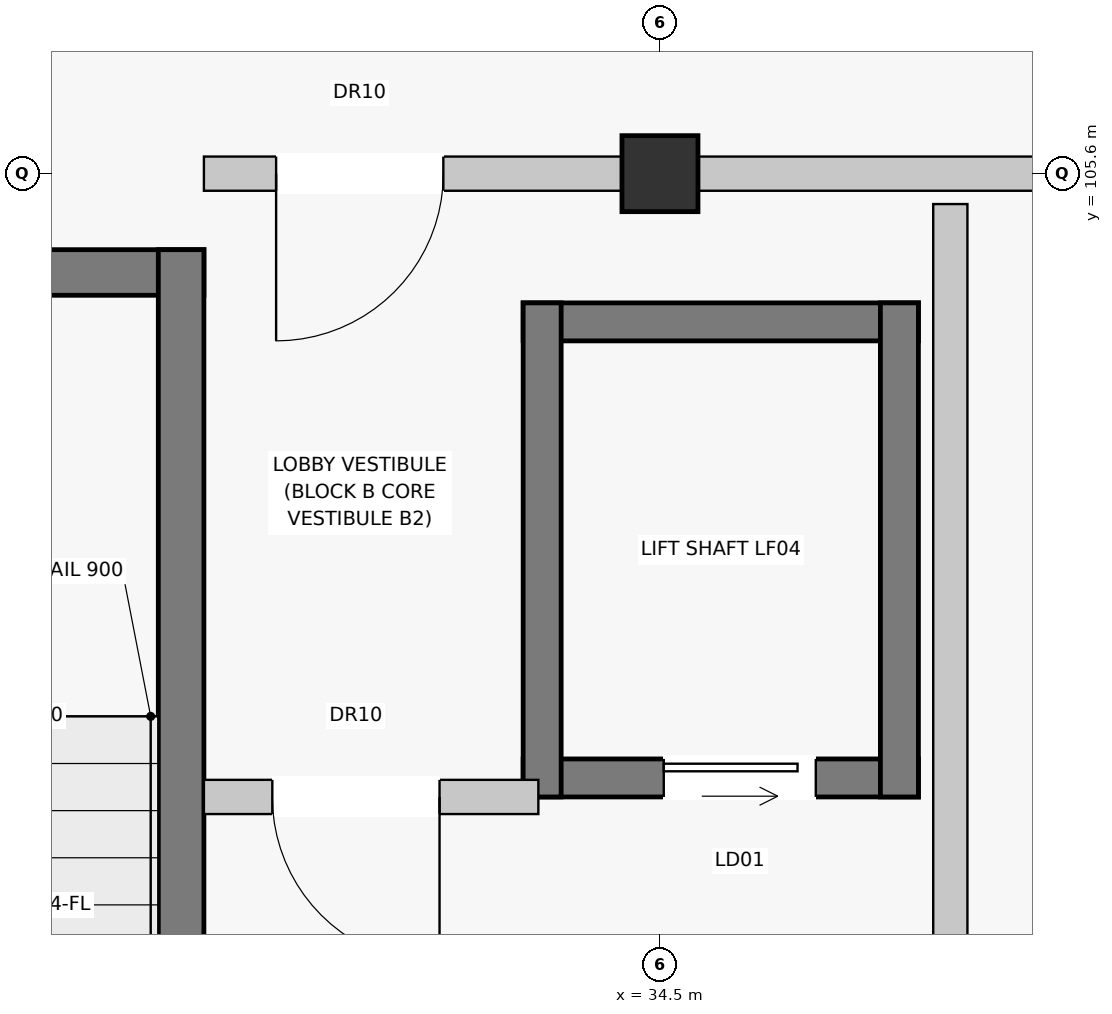
"""IFC4 building model, lengths in metres.
Left out: names, types, materials, properties, quantities, classifications, styles, units other than length and angle.
Written with IfcOpenShell. Run it as: python <this file> out.ifc"""

import sys

from ifc_helpers import new_model, si_unit, direction, frame, frame_2d, origin, origin_with_axes, origin_2d, place, context, subcontext, project, spatial, rectangle, extrude, element, fill, save


model = new_model("IFC4")
c1 = context("Model", 3, precision=1e-05, world=origin(), true_north=direction((0.0, 1.0)))
c2 = subcontext(c1, "Body", "Model", "MODEL_VIEW")
j1 = project(units=[si_unit("LENGTHUNIT", "METRE"), si_unit("PLANEANGLEUNIT", "RADIAN")], contexts=[c1])
p1 = place(None, origin())
s1 = spatial("IfcSite", under=j1, at=p1, CompositionType="ELEMENT")
p2 = place(p1, origin())
s2 = spatial("IfcBuilding", under=s1, at=p2, CompositionType="ELEMENT")
p3 = place(p2, frame((0.0, 0.0, 11.2)))
s3 = spatial("IfcBuildingStorey", under=s2, at=p3, CompositionType="ELEMENT", Elevation=11.2)
p4 = place(p3, frame((34.5, 105.6, 0.0), z_axis=(0.0, 0.0, 1.0), x_axis=(1.0, 0.0, 0.0)))
e1 = element("IfcColumn", 1, at=p4, inside=s3, PredefinedType="COLUMN", context=c2, shape_type="SweptSolid", body=[
    extrude(rectangle(XDim=0.5, YDim=0.5, at=origin_2d()), origin(), (0.0, 0.0, 1.0), 3.2),
])
p5 = place(p3, frame((27.9, 104.95, 0.0), z_axis=(0.0, 0.0, 1.0), x_axis=(1.0, 0.0, 0.0)))
e2 = element("IfcWall", 2, at=p5, inside=s3, PredefinedType="SHEAR", context=c2, shape_type="SweptSolid", body=[
    extrude(rectangle(XDim=3.6, YDim=0.3, at=frame_2d((1.8, 0.0))), origin(), (0.0, 0.0, 1.0), 2.94),
])
p6 = place(p3, frame((31.35, 97.6, 0.0), z_axis=(0.0, 0.0, 1.0), x_axis=(0.0, 1.0, 0.0)))
e3 = element("IfcWall", 3, at=p6, inside=s3, PredefinedType="SHEAR", context=c2, shape_type="SweptSolid", body=[
    extrude(rectangle(XDim=7.5, YDim=0.3, at=frame_2d((3.75, 0.0))), origin(), (0.0, 0.0, 1.0), 2.94),
])
p7 = place(p6, frame((0.65, 0.0, 0.0)))
e4 = element("IfcOpeningElement", 4, at=p7, cuts=e3, PredefinedType="OPENING", context=c2, shape_type="SweptSolid", body=[
    extrude(rectangle(XDim=1.15, YDim=2.15, at=frame_2d((0.575, 1.075))), frame((0.0, 0.162, 0.0), z_axis=(0.0, -1.0, 0.0), x_axis=(1.0, 0.0, 0.0)), (0.0, 0.0, 1.0), 0.324),
])
p8 = place(p3, frame((33.6, 101.625, 0.0), z_axis=(0.0, 0.0, 1.0), x_axis=(1.0, 0.0, 0.0)))
e5 = element("IfcWall", 5, at=p8, inside=s3, PredefinedType="SHEAR", context=c2, shape_type="SweptSolid", body=[
    extrude(rectangle(XDim=2.6, YDim=0.25, at=frame_2d((1.3, 0.0))), origin(), (0.0, 0.0, 1.0), 2.94),
])
p9 = place(p8, frame((0.925, 0.0, 0.0)))
e6 = element("IfcOpeningElement", 6, at=p9, cuts=e5, PredefinedType="OPENING", context=c2, shape_type="SweptSolid", body=[
    extrude(rectangle(XDim=1.0, YDim=2.1, at=frame_2d((0.5, 1.05))), frame((0.0, 0.137, 0.0), z_axis=(0.0, -1.0, 0.0), x_axis=(1.0, 0.0, 0.0)), (0.0, 0.0, 1.0), 0.274),
])
p10 = place(p3, frame((33.6, 104.625, 0.0), z_axis=(0.0, 0.0, 1.0), x_axis=(1.0, 0.0, 0.0)))
e7 = element("IfcWall", 7, at=p10, inside=s3, PredefinedType="SHEAR", context=c2, shape_type="SweptSolid", body=[
    extrude(rectangle(XDim=2.6, YDim=0.25, at=frame_2d((1.3, 0.0))), origin(), (0.0, 0.0, 1.0), 2.94),
])
for number, where, z_axis, x_axis in (
    (8, (33.725, 101.5, 0.0), (0.0, 0.0, 1.0), (0.0, 1.0, 0.0)),
    (9, (36.075, 101.5, 0.0), (0.0, 0.0, 1.0), (0.0, 1.0, 0.0)),
):
    element("IfcWall", number, at=place(p3, frame(where, z_axis=z_axis, x_axis=x_axis)), inside=s3, PredefinedType="SHEAR", context=c2, shape_type="SweptSolid", body=[
        extrude(rectangle(XDim=3.25, YDim=0.25, at=frame_2d((1.625, 0.0))), origin(), (0.0, 0.0, 1.0), 2.94),
    ])
p11 = place(p3, frame((36.41, 97.8, 0.0), z_axis=(0.0, 0.0, 1.0), x_axis=(0.0, 1.0, 0.0)))
e10 = element("IfcWall", 10, at=p11, inside=s3, PredefinedType="PARTITIONING", context=c2, shape_type="SweptSolid", body=[
    extrude(rectangle(XDim=7.6, YDim=0.225, at=frame_2d((3.8, 0.0))), origin(), (0.0, 0.0, 1.0), 2.59),
])
p12 = place(p3, frame((31.5, 101.5, 0.0), z_axis=(0.0, 0.0, 1.0), x_axis=(1.0, 0.0, 0.0)))
e11 = element("IfcWall", 11, at=p12, inside=s3, PredefinedType="PARTITIONING", context=c2, shape_type="SweptSolid", body=[
    extrude(rectangle(XDim=2.2, YDim=0.225, at=frame_2d((1.1, 0.0))), origin(), (0.0, 0.0, 1.0), 2.94),
])
p13 = place(p12, frame((0.45, 0.0, 0.0)))
e12 = element("IfcOpeningElement", 12, at=p13, cuts=e11, PredefinedType="OPENING", context=c2, shape_type="SweptSolid", body=[
    extrude(rectangle(XDim=1.1, YDim=2.15, at=frame_2d((0.55, 1.075))), frame((0.0, 0.125, 0.0), z_axis=(0.0, -1.0, 0.0), x_axis=(1.0, 0.0, 0.0)), (0.0, 0.0, 1.0), 0.249),
])
p14 = place(p3, frame((31.5, 105.6, 0.0), z_axis=(0.0, 0.0, 1.0), x_axis=(1.0, 0.0, 0.0)))
e13 = element("IfcWall", 13, at=p14, inside=s3, PredefinedType="PARTITIONING", context=c2, shape_type="SweptSolid", body=[
    extrude(rectangle(XDim=9.9, YDim=0.225, at=frame_2d((4.95, 0.0))), origin(), (0.0, 0.0, 1.0), 2.38),
])
p15 = place(p14, frame((0.475, 0.0, 0.0)))
e14 = element("IfcOpeningElement", 14, at=p15, cuts=e13, PredefinedType="OPENING", context=c2, shape_type="SweptSolid", body=[
    extrude(rectangle(XDim=1.1, YDim=2.15, at=frame_2d((0.55, 1.075))), frame((0.0, 0.125, 0.0), z_axis=(0.0, -1.0, 0.0), x_axis=(1.0, 0.0, 0.0)), (0.0, 0.0, 1.0), 0.249),
])
p16 = place(p14, frame((5.75, 0.0, 0.0)))
e15 = element("IfcOpeningElement", 15, at=p16, cuts=e13, PredefinedType="OPENING", context=c2, shape_type="SweptSolid", body=[
    extrude(rectangle(XDim=0.9, YDim=2.1, at=frame_2d((0.45, 1.05))), frame((0.0, 0.125, 0.0), z_axis=(0.0, -1.0, 0.0), x_axis=(1.0, 0.0, 0.0)), (0.0, 0.0, 1.0), 0.249),
])
p17 = place(p14, frame((7.8, 0.0, 0.0)))
e16 = element("IfcOpeningElement", 16, at=p17, cuts=e13, PredefinedType="OPENING", context=c2, shape_type="SweptSolid", body=[
    extrude(rectangle(XDim=0.95, YDim=2.15, at=frame_2d((0.475, 1.075))), frame((0.0, 0.125, 0.0), z_axis=(0.0, -1.0, 0.0), x_axis=(1.0, 0.0, 0.0)), (0.0, 0.0, 1.0), 0.249),
])
p18 = place(p9, origin_with_axes())
e17 = element("IfcDoor", 17, at=p18, inside=s3, OperationType="SLIDING_TO_LEFT", PredefinedType="DOOR", context=c2, shape_type="SweptSolid", body=[
    extrude(rectangle(XDim=1.0, YDim=2.1, at=frame_2d((0.5, 1.05))), frame((0.0, 0.025, 0.0), z_axis=(0.0, -1.0, 0.0), x_axis=(1.0, 0.0, 0.0)), (0.0, 0.0, 1.0), 0.05),
])
fill(e6, e17)
p19 = place(p13, frame((1.1, 0.0, 0.0), z_axis=(0.0, 0.0, 1.0), x_axis=(-1.0, 0.0, 0.0)))
e18 = element("IfcDoor", 18, at=p19, inside=s3, OperationType="SINGLE_SWING_RIGHT", PredefinedType="DOOR", context=c2, shape_type="SweptSolid", body=[
    extrude(rectangle(XDim=1.1, YDim=2.15, at=frame_2d((0.55, 1.075))), frame((0.0, 0.025, 0.0), z_axis=(0.0, -1.0, 0.0), x_axis=(1.0, 0.0, 0.0)), (0.0, 0.0, 1.0), 0.05),
])
fill(e12, e18)
p20 = place(p15, frame((1.1, 0.0, 0.0), z_axis=(0.0, 0.0, 1.0), x_axis=(-1.0, 0.0, 0.0)))
e19 = element("IfcDoor", 19, at=p20, inside=s3, OperationType="SINGLE_SWING_LEFT", PredefinedType="DOOR", context=c2, shape_type="SweptSolid", body=[
    extrude(rectangle(XDim=1.1, YDim=2.15, at=frame_2d((0.55, 1.075))), frame((0.0, 0.025, 0.0), z_axis=(0.0, -1.0, 0.0), x_axis=(1.0, 0.0, 0.0)), (0.0, 0.0, 1.0), 0.05),
])
fill(e14, e19)
save(model, sys.argv[1])
